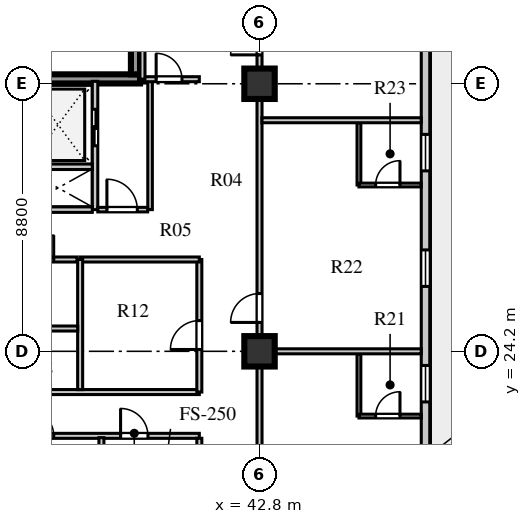
"""IFC4 building model, lengths in metres.
Left out: names, types, materials, properties, quantities, classifications, styles, units other than length and angle.
Written with IfcOpenShell. Run it as: python <this file> out.ifc"""

import sys

from ifc_helpers import new_model, si_unit, direction, frame, frame_2d, origin, origin_2d, place, context, subcontext, project, spatial, rectangle, extrude, element, fill, save


model = new_model("IFC4")
c1 = context("Model", 3, precision=1e-05, world=origin(), true_north=direction((0.0, 1.0)))
c2 = subcontext(c1, "Body", "Model", "MODEL_VIEW")
j1 = project(units=[si_unit("LENGTHUNIT", "METRE"), si_unit("PLANEANGLEUNIT", "RADIAN")], contexts=[c1])
p1 = place(None, origin())
s1 = spatial("IfcSite", under=j1, at=p1, CompositionType="ELEMENT")
p2 = place(p1, origin())
s2 = spatial("IfcBuilding", under=s1, at=p2, CompositionType="ELEMENT")
p3 = place(p2, frame((0.0, 0.0, 142.5)))
s3 = spatial("IfcBuildingStorey", under=s2, at=p3, CompositionType="ELEMENT", Elevation=142.5)
p4 = place(p3, frame((34.3, 33.16, 0.0), z_axis=(0.0, 0.0, 1.0), x_axis=(1.0, 0.0, 0.0)))
e1 = element("IfcWall", 1, at=p4, inside=s3, PredefinedType="SHEAR", context=c2, shape_type="SweptSolid", body=[
    extrude(rectangle(XDim=4.57, YDim=0.3, at=frame_2d((2.285, 0.0))), origin(), (0.0, 0.0, 1.0), 3.6),
])
p5 = place(p3, frame((38.72, 33.31, 0.0), z_axis=(0.0, 0.0, 1.0), x_axis=(0.0, 1.0, 0.0)))
e2 = element("IfcWall", 2, at=p5, inside=s3, PredefinedType="SHEAR", context=c2, shape_type="SweptSolid", body=[
    extrude(rectangle(XDim=8.03, YDim=0.3, at=frame_2d((4.015, 0.0))), origin(), (0.0, 0.0, 1.0), 3.6),
])
for number, where, z_axis, x_axis in (
    (3, (42.8, 24.2, 0.0), (0.0, 0.0, 1.0), (1.0, 0.0, 0.0)),
    (4, (42.8, 33.0, 0.0), (0.0, 0.0, 1.0), (1.0, 0.0, 0.0)),
):
    element("IfcColumn", number, at=place(p3, frame(where, z_axis=z_axis, x_axis=x_axis)), inside=s3, PredefinedType="COLUMN", context=c2, shape_type="SweptSolid", body=[
        extrude(rectangle(XDim=1.0, YDim=1.0, at=origin_2d()), origin(), (0.0, 0.0, 1.0), 3.6),
    ])
p6 = place(p3, frame((48.26, 13.33, 0.0), z_axis=(0.0, 0.0, 1.0), x_axis=(0.0, 1.0, 0.0)))
e5 = element("IfcWall", 5, at=p6, inside=s3, PredefinedType="STANDARD", context=c2, shape_type="SweptSolid", body=[
    extrude(rectangle(XDim=30.54, YDim=0.28, at=frame_2d((15.27, 0.0))), origin(), (0.0, 0.0, 1.0), 3.6),
])
p7 = place(p6, frame((2.41, 0.0, 0.0)))
e6 = element("IfcOpeningElement", 6, at=p7, cuts=e5, PredefinedType="OPENING", context=c2, shape_type="SweptSolid", body=[
    extrude(rectangle(XDim=1.0, YDim=2.05, at=frame_2d((0.5, 1.025))), frame((0.0, 0.15, 0.0), z_axis=(0.0, -1.0, 0.0), x_axis=(1.0, 0.0, 0.0)), (0.0, 0.0, 1.0), 0.3),
])
p8 = place(p6, frame((5.205, 0.0, 0.8)))
e7 = element("IfcOpeningElement", 7, at=p8, cuts=e5, PredefinedType="OPENING", context=c2, shape_type="SweptSolid", body=[
    extrude(rectangle(XDim=1.8, YDim=2.0, at=frame_2d((0.9, 1.0))), frame((0.0, 0.15, 0.0), z_axis=(0.0, -1.0, 0.0), x_axis=(1.0, 0.0, 0.0)), (0.0, 0.0, 1.0), 0.3),
])
p9 = place(p6, frame((9.205, 0.0, 0.8)))
e8 = element("IfcOpeningElement", 8, at=p9, cuts=e5, PredefinedType="OPENING", context=c2, shape_type="SweptSolid", body=[
    extrude(rectangle(XDim=1.2, YDim=1.75, at=frame_2d((0.6, 0.875))), frame((0.0, 0.15, 0.0), z_axis=(0.0, -1.0, 0.0), x_axis=(1.0, 0.0, 0.0)), (0.0, 0.0, 1.0), 0.3),
])
p10 = place(p6, frame((13.005, 0.0, 0.8)))
e9 = element("IfcOpeningElement", 9, at=p10, cuts=e5, PredefinedType="OPENING", context=c2, shape_type="SweptSolid", body=[
    extrude(rectangle(XDim=1.2, YDim=1.75, at=frame_2d((0.6, 0.875))), frame((0.0, 0.15, 0.0), z_axis=(0.0, -1.0, 0.0), x_axis=(1.0, 0.0, 0.0)), (0.0, 0.0, 1.0), 0.3),
])
p11 = place(p6, frame((16.805, 0.0, 0.8)))
e10 = element("IfcOpeningElement", 10, at=p11, cuts=e5, PredefinedType="OPENING", context=c2, shape_type="SweptSolid", body=[
    extrude(rectangle(XDim=1.2, YDim=1.75, at=frame_2d((0.6, 0.875))), frame((0.0, 0.15, 0.0), z_axis=(0.0, -1.0, 0.0), x_axis=(1.0, 0.0, 0.0)), (0.0, 0.0, 1.0), 0.3),
])
p12 = place(p6, frame((21.38, 0.0, 0.8)))
e11 = element("IfcOpeningElement", 11, at=p12, cuts=e5, PredefinedType="OPENING", context=c2, shape_type="SweptSolid", body=[
    extrude(rectangle(XDim=2.1, YDim=1.95, at=frame_2d((1.05, 0.975))), frame((0.0, 0.15, 0.0), z_axis=(0.0, -1.0, 0.0), x_axis=(1.0, 0.0, 0.0)), (0.0, 0.0, 1.0), 0.3),
])
p13 = place(p6, frame((26.905, 0.0, 0.8)))
e12 = element("IfcOpeningElement", 12, at=p13, cuts=e5, PredefinedType="OPENING", context=c2, shape_type="SweptSolid", body=[
    extrude(rectangle(XDim=1.2, YDim=1.75, at=frame_2d((0.6, 0.875))), frame((0.0, 0.15, 0.0), z_axis=(0.0, -1.0, 0.0), x_axis=(1.0, 0.0, 0.0)), (0.0, 0.0, 1.0), 0.3),
])
p14 = place(p3, frame((37.39, 28.86, 0.0), z_axis=(0.0, 0.0, 1.0), x_axis=(0.0, 1.0, 0.0)))
e13 = element("IfcWall", 13, at=p14, inside=s3, PredefinedType="SOLIDWALL", context=c2, shape_type="SweptSolid", body=[
    extrude(rectangle(XDim=4.22, YDim=0.18, at=frame_2d((2.11, 0.0))), origin(), (0.0, 0.0, 1.0), 3.6),
])
p15 = place(p14, frame((2.1, 0.0, 0.0)))
e14 = element("IfcOpeningElement", 14, at=p15, cuts=e13, PredefinedType="OPENING", context=c2, shape_type="SweptSolid", body=[
    extrude(rectangle(XDim=1.2, YDim=2.12, at=frame_2d((0.6, 1.06))), frame((0.0, 0.1, 0.0), z_axis=(0.0, -1.0, 0.0), x_axis=(1.0, 0.0, 0.0)), (0.0, 0.0, 1.0), 0.2),
])
for number, where, z_axis, x_axis in (
    (15, (35.05, 28.86, 0.0), (0.0, 0.0, 1.0), (1.0, 0.0, 0.0)),
    (16, (35.05, 30.27, 0.0), (0.0, 0.0, 1.0), (1.0, 0.0, 0.0)),
):
    element("IfcWall", number, at=place(p3, frame(where, z_axis=z_axis, x_axis=x_axis)), inside=s3, PredefinedType="SOLIDWALL", context=c2, shape_type="SweptSolid", body=[
        extrude(rectangle(XDim=2.25, YDim=0.18, at=frame_2d((1.125, 0.0))), origin(), (0.0, 0.0, 1.0), 3.6),
    ])
p16 = place(p3, frame((39.2, 28.86, 0.0), z_axis=(0.0, 0.0, 1.0), x_axis=(0.0, 1.0, 0.0)))
e17 = element("IfcWall", 17, at=p16, inside=s3, PredefinedType="PARTITIONING", context=c2, shape_type="SweptSolid", body=[
    extrude(rectangle(XDim=4.22, YDim=0.15, at=frame_2d((2.11, 0.0))), origin(), (0.0, 0.0, 1.0), 3.6),
])
p17 = place(p3, frame((37.48, 28.86, 0.0), z_axis=(0.0, 0.0, 1.0), x_axis=(1.0, 0.0, 0.0)))
e18 = element("IfcWall", 18, at=p17, inside=s3, PredefinedType="PARTITIONING", context=c2, shape_type="SweptSolid", body=[
    extrude(rectangle(XDim=1.64, YDim=0.15, at=frame_2d((0.82, 0.0))), origin(), (0.0, 0.0, 1.0), 3.6),
])
p18 = place(p17, frame((0.3, 0.0, 0.0)))
e19 = element("IfcOpeningElement", 19, at=p18, cuts=e18, PredefinedType="OPENING", context=c2, shape_type="SweptSolid", body=[
    extrude(rectangle(XDim=1.0, YDim=2.1, at=frame_2d((0.5, 1.05))), frame((0.0, 0.085, 0.0), z_axis=(0.0, -1.0, 0.0), x_axis=(1.0, 0.0, 0.0)), (0.0, 0.0, 1.0), 0.17),
])
p19 = place(p3, frame((25.22, 21.42, 0.0), z_axis=(0.0, 0.0, 1.0), x_axis=(1.0, 0.0, 0.0)))
e20 = element("IfcWall", 20, at=p19, inside=s3, PredefinedType="PARTITIONING", context=c2, shape_type="SweptSolid", body=[
    extrude(rectangle(XDim=15.6, YDim=0.165, at=frame_2d((7.8, 0.0))), origin(), (0.0, 0.0, 1.0), 3.2),
])
p20 = place(p19, frame((0.63, 0.0, 0.0)))
e21 = element("IfcOpeningElement", 21, at=p20, cuts=e20, PredefinedType="OPENING", context=c2, shape_type="SweptSolid", body=[
    extrude(rectangle(XDim=0.9, YDim=2.08, at=frame_2d((0.45, 1.04))), frame((0.0, 0.093, 0.0), z_axis=(0.0, -1.0, 0.0), x_axis=(1.0, 0.0, 0.0)), (0.0, 0.0, 1.0), 0.185),
])
p21 = place(p19, frame((3.71, 0.0, 0.0)))
e22 = element("IfcOpeningElement", 22, at=p21, cuts=e20, PredefinedType="OPENING", context=c2, shape_type="SweptSolid", body=[
    extrude(rectangle(XDim=0.9, YDim=2.08, at=frame_2d((0.45, 1.04))), frame((0.0, 0.093, 0.0), z_axis=(0.0, -1.0, 0.0), x_axis=(1.0, 0.0, 0.0)), (0.0, 0.0, 1.0), 0.185),
])
p22 = place(p19, frame((6.81, 0.0, 0.0)))
e23 = element("IfcOpeningElement", 23, at=p22, cuts=e20, PredefinedType="OPENING", context=c2, shape_type="SweptSolid", body=[
    extrude(rectangle(XDim=0.9, YDim=2.08, at=frame_2d((0.45, 1.04))), frame((0.0, 0.093, 0.0), z_axis=(0.0, -1.0, 0.0), x_axis=(1.0, 0.0, 0.0)), (0.0, 0.0, 1.0), 0.185),
])
p23 = place(p19, frame((9.91, 0.0, 0.0)))
e24 = element("IfcOpeningElement", 24, at=p23, cuts=e20, PredefinedType="OPENING", context=c2, shape_type="SweptSolid", body=[
    extrude(rectangle(XDim=0.9, YDim=2.08, at=frame_2d((0.45, 1.04))), frame((0.0, 0.093, 0.0), z_axis=(0.0, -1.0, 0.0), x_axis=(1.0, 0.0, 0.0)), (0.0, 0.0, 1.0), 0.185),
])
p24 = place(p19, frame((13.01, 0.0, 0.0)))
e25 = element("IfcOpeningElement", 25, at=p24, cuts=e20, PredefinedType="OPENING", context=c2, shape_type="SweptSolid", body=[
    extrude(rectangle(XDim=0.9, YDim=2.08, at=frame_2d((0.45, 1.04))), frame((0.0, 0.093, 0.0), z_axis=(0.0, -1.0, 0.0), x_axis=(1.0, 0.0, 0.0)), (0.0, 0.0, 1.0), 0.185),
])
p25 = place(p3, frame((27.15, 22.86, 0.0), z_axis=(0.0, 0.0, 1.0), x_axis=(1.0, 0.0, 0.0)))
e26 = element("IfcWall", 26, at=p25, inside=s3, PredefinedType="PARTITIONING", context=c2, shape_type="SweptSolid", body=[
    extrude(rectangle(XDim=13.67, YDim=0.165, at=frame_2d((6.835, 0.0))), origin(), (0.0, 0.0, 1.0), 3.6),
])
p26 = place(p25, frame((2.2, 0.0, 0.0)))
e27 = element("IfcOpeningElement", 27, at=p26, cuts=e26, PredefinedType="OPENING", context=c2, shape_type="SweptSolid", body=[
    extrude(rectangle(XDim=0.9, YDim=2.08, at=frame_2d((0.45, 1.04))), frame((0.0, 0.093, 0.0), z_axis=(0.0, -1.0, 0.0), x_axis=(1.0, 0.0, 0.0)), (0.0, 0.0, 1.0), 0.185),
])
p27 = place(p3, frame((42.8, 15.25, 0.0), z_axis=(0.0, 0.0, 1.0), x_axis=(0.0, 1.0, 0.0)))
e28 = element("IfcWall", 28, at=p27, inside=s3, PredefinedType="PARTITIONING", context=c2, shape_type="SweptSolid", body=[
    extrude(rectangle(XDim=26.7, YDim=0.165, at=frame_2d((13.35, 0.0))), origin(), (0.0, 0.0, 1.0), 2.95),
])
p28 = place(p27, frame((0.75, 0.0, 0.0)))
e29 = element("IfcOpeningElement", 29, at=p28, cuts=e28, PredefinedType="OPENING", context=c2, shape_type="SweptSolid", body=[
    extrude(rectangle(XDim=0.95, YDim=2.1, at=frame_2d((0.475, 1.05))), frame((0.0, 0.093, 0.0), z_axis=(0.0, -1.0, 0.0), x_axis=(1.0, 0.0, 0.0)), (0.0, 0.0, 1.0), 0.185),
])
p29 = place(p27, frame((9.9, 0.0, 0.0)))
e30 = element("IfcOpeningElement", 30, at=p29, cuts=e28, PredefinedType="OPENING", context=c2, shape_type="SweptSolid", body=[
    extrude(rectangle(XDim=0.95, YDim=2.1, at=frame_2d((0.475, 1.05))), frame((0.0, 0.093, 0.0), z_axis=(0.0, -1.0, 0.0), x_axis=(1.0, 0.0, 0.0)), (0.0, 0.0, 1.0), 0.185),
])
p30 = place(p27, frame((18.7, 0.0, 0.0)))
e31 = element("IfcOpeningElement", 31, at=p30, cuts=e28, PredefinedType="OPENING", context=c2, shape_type="SweptSolid", body=[
    extrude(rectangle(XDim=0.95, YDim=2.1, at=frame_2d((0.475, 1.05))), frame((0.0, 0.093, 0.0), z_axis=(0.0, -1.0, 0.0), x_axis=(1.0, 0.0, 0.0)), (0.0, 0.0, 1.0), 0.185),
])
p31 = place(p3, frame((40.82, 22.86, 0.0), z_axis=(0.0, 0.0, 1.0), x_axis=(0.0, 1.0, 0.0)))
e32 = element("IfcWall", 32, at=p31, inside=s3, PredefinedType="PARTITIONING", context=c2, shape_type="SweptSolid", body=[
    extrude(rectangle(XDim=4.36, YDim=0.165, at=frame_2d((2.18, 0.0))), origin(), (0.0, 0.0, 1.0), 3.6),
])
p32 = place(p31, frame((1.4, 0.0, 0.0)))
e33 = element("IfcOpeningElement", 33, at=p32, cuts=e32, PredefinedType="OPENING", context=c2, shape_type="SweptSolid", body=[
    extrude(rectangle(XDim=0.95, YDim=2.1, at=frame_2d((0.475, 1.05))), frame((0.0, 0.093, 0.0), z_axis=(0.0, -1.0, 0.0), x_axis=(1.0, 0.0, 0.0)), (0.0, 0.0, 1.0), 0.185),
])
p33 = place(p3, frame((36.9, 27.22, 0.0), z_axis=(0.0, 0.0, 1.0), x_axis=(1.0, 0.0, 0.0)))
e34 = element("IfcWall", 34, at=p33, inside=s3, PredefinedType="PARTITIONING", context=c2, shape_type="SweptSolid", body=[
    extrude(rectangle(XDim=3.92, YDim=0.165, at=frame_2d((1.96, 0.0))), origin(), (0.0, 0.0, 1.0), 3.2),
])
p34 = place(p3, frame((36.9, 22.94, 0.0), z_axis=(0.0, 0.0, 1.0), x_axis=(0.0, 1.0, 0.0)))
e35 = element("IfcWall", 35, at=p34, inside=s3, PredefinedType="PARTITIONING", context=c2, shape_type="SweptSolid", body=[
    extrude(rectangle(XDim=4.28, YDim=0.165, at=frame_2d((2.14, 0.0))), origin(), (0.0, 0.0, 1.0), 3.6),
])
p35 = place(p3, frame((27.15, 24.95, 0.0), z_axis=(0.0, 0.0, 1.0), x_axis=(1.0, 0.0, 0.0)))
e36 = element("IfcWall", 36, at=p35, inside=s3, PredefinedType="PARTITIONING", context=c2, shape_type="SweptSolid", body=[
    extrude(rectangle(XDim=9.67, YDim=0.165, at=frame_2d((4.835, 0.0))), origin(), (0.0, 0.0, 1.0), 3.05),
])
p36 = place(p3, frame((33.28, 27.22, 0.0), z_axis=(0.0, 0.0, 1.0), x_axis=(1.0, 0.0, 0.0)))
e37 = element("IfcWall", 37, at=p36, inside=s3, PredefinedType="PARTITIONING", context=c2, shape_type="SweptSolid", body=[
    extrude(rectangle(XDim=3.52, YDim=0.165, at=frame_2d((1.76, 0.0))), origin(), (0.0, 0.0, 1.0), 3.2),
])
p37 = place(p36, frame((1.95, 0.0, 0.0)))
e38 = element("IfcOpeningElement", 38, at=p37, cuts=e37, PredefinedType="OPENING", context=c2, shape_type="SweptSolid", body=[
    extrude(rectangle(XDim=0.8, YDim=2.05, at=frame_2d((0.4, 1.025))), frame((0.0, 0.093, 0.0), z_axis=(0.0, -1.0, 0.0), x_axis=(1.0, 0.0, 0.0)), (0.0, 0.0, 1.0), 0.185),
])
p38 = place(p3, frame((40.82, 10.28, 0.0), z_axis=(0.0, 0.0, 1.0), x_axis=(0.0, 1.0, 0.0)))
e39 = element("IfcWall", 39, at=p38, inside=s3, PredefinedType="PARTITIONING", context=c2, shape_type="SweptSolid", body=[
    extrude(rectangle(XDim=11.06, YDim=0.165, at=frame_2d((5.53, 0.0))), origin(), (0.0, 0.0, 1.0), 3.6),
])
p39 = place(p3, frame((37.6, 10.28, 0.0), z_axis=(0.0, 0.0, 1.0), x_axis=(0.0, 1.0, 0.0)))
e40 = element("IfcWall", 40, at=p39, inside=s3, PredefinedType="PARTITIONING", context=c2, shape_type="SweptSolid", body=[
    extrude(rectangle(XDim=11.08, YDim=0.165, at=frame_2d((5.54, 0.0))), origin(), (0.0, 0.0, 1.0), 3.6),
])
p40 = place(p3, frame((46.07, 22.07, 0.0), z_axis=(0.0, 0.0, 1.0), x_axis=(0.0, 1.0, 0.0)))
e41 = element("IfcWall", 41, at=p40, inside=s3, PredefinedType="PLUMBINGWALL", context=c2, shape_type="SweptSolid", body=[
    extrude(rectangle(XDim=2.05, YDim=0.125, at=frame_2d((1.025, 0.0))), origin(), (0.0, 0.0, 1.0), 3.6),
])
p41 = place(p3, frame((46.07, 22.07, 0.0), z_axis=(0.0, 0.0, 1.0), x_axis=(1.0, 0.0, 0.0)))
e42 = element("IfcWall", 42, at=p41, inside=s3, PredefinedType="PLUMBINGWALL", context=c2, shape_type="SweptSolid", body=[
    extrude(rectangle(XDim=2.05, YDim=0.125, at=frame_2d((1.025, 0.0))), origin(), (0.0, 0.0, 1.0), 3.6),
])
p42 = place(p41, frame((0.55, 0.0, 0.0)))
e43 = element("IfcOpeningElement", 43, at=p42, cuts=e42, PredefinedType="OPENING", context=c2, shape_type="SweptSolid", body=[
    extrude(rectangle(XDim=0.8, YDim=2.05, at=frame_2d((0.4, 1.025))), frame((0.0, 0.073, 0.0), z_axis=(0.0, -1.0, 0.0), x_axis=(1.0, 0.0, 0.0)), (0.0, 0.0, 1.0), 0.145),
])
p43 = place(p3, frame((42.88, 24.2, 0.0), z_axis=(0.0, 0.0, 1.0), x_axis=(1.0, 0.0, 0.0)))
e44 = element("IfcWall", 44, at=p43, inside=s3, PredefinedType="PARTITIONING", context=c2, shape_type="SweptSolid", body=[
    extrude(rectangle(XDim=5.24, YDim=0.165, at=frame_2d((2.62, 0.0))), origin(), (0.0, 0.0, 1.0), 3.1),
])
p44 = place(p3, frame((46.07, 29.67, 0.0), z_axis=(0.0, 0.0, 1.0), x_axis=(0.0, 1.0, 0.0)))
e45 = element("IfcWall", 45, at=p44, inside=s3, PredefinedType="PLUMBINGWALL", context=c2, shape_type="SweptSolid", body=[
    extrude(rectangle(XDim=2.05, YDim=0.125, at=frame_2d((1.025, 0.0))), origin(), (0.0, 0.0, 1.0), 3.6),
])
p45 = place(p3, frame((46.07, 29.67, 0.0), z_axis=(0.0, 0.0, 1.0), x_axis=(1.0, 0.0, 0.0)))
e46 = element("IfcWall", 46, at=p45, inside=s3, PredefinedType="PLUMBINGWALL", context=c2, shape_type="SweptSolid", body=[
    extrude(rectangle(XDim=2.05, YDim=0.125, at=frame_2d((1.025, 0.0))), origin(), (0.0, 0.0, 1.0), 3.6),
])
p46 = place(p45, frame((0.55, 0.0, 0.0)))
e47 = element("IfcOpeningElement", 47, at=p46, cuts=e46, PredefinedType="OPENING", context=c2, shape_type="SweptSolid", body=[
    extrude(rectangle(XDim=0.8, YDim=2.05, at=frame_2d((0.4, 1.025))), frame((0.0, 0.073, 0.0), z_axis=(0.0, -1.0, 0.0), x_axis=(1.0, 0.0, 0.0)), (0.0, 0.0, 1.0), 0.145),
])
p47 = place(p3, frame((42.88, 31.8, 0.0), z_axis=(0.0, 0.0, 1.0), x_axis=(1.0, 0.0, 0.0)))
e48 = element("IfcWall", 48, at=p47, inside=s3, PredefinedType="PARTITIONING", context=c2, shape_type="SweptSolid", body=[
    extrude(rectangle(XDim=5.24, YDim=0.165, at=frame_2d((2.62, 0.0))), origin(), (0.0, 0.0, 1.0), 3.6),
])
p48 = place(p3, frame((38.95, 33.15, 0.0), z_axis=(0.0, 0.0, 1.0), x_axis=(1.0, 0.0, 0.0)))
e49 = element("IfcWall", 49, at=p48, inside=s3, PredefinedType="PARTITIONING", context=c2, shape_type="SweptSolid", body=[
    extrude(rectangle(XDim=1.87, YDim=0.165, at=frame_2d((0.935, 0.0))), origin(), (0.0, 0.0, 1.0), 3.6),
])
p49 = place(p48, frame((0.45, 0.0, 0.0)))
e50 = element("IfcOpeningElement", 50, at=p49, cuts=e49, PredefinedType="OPENING", context=c2, shape_type="SweptSolid", body=[
    extrude(rectangle(XDim=0.85, YDim=2.05, at=frame_2d((0.425, 1.025))), frame((0.0, 0.093, 0.0), z_axis=(0.0, -1.0, 0.0), x_axis=(1.0, 0.0, 0.0)), (0.0, 0.0, 1.0), 0.185),
])
p50 = place(p3, frame((38.95, 33.15, 0.0), z_axis=(0.0, 0.0, 1.0), x_axis=(0.0, 1.0, 0.0)))
e51 = element("IfcWall", 51, at=p50, inside=s3, PredefinedType="PARTITIONING", context=c2, shape_type="SweptSolid", body=[
    extrude(rectangle(XDim=8.7, YDim=0.165, at=frame_2d((4.35, 0.0))), origin(), (0.0, 0.0, 1.0), 3.6),
])
p51 = place(p9, origin())
e52 = element("IfcWindow", 52, at=p51, inside=s3, PartitioningType="SINGLE_PANEL", PredefinedType="WINDOW", context=c2, shape_type="SweptSolid", body=[
    extrude(rectangle(XDim=1.2, YDim=1.75, at=frame_2d((0.6, 0.875))), frame((0.0, 0.03, 0.0), z_axis=(0.0, -1.0, 0.0), x_axis=(1.0, 0.0, 0.0)), (0.0, 0.0, 1.0), 0.06),
])
fill(e8, e52)
p52 = place(p10, origin())
e53 = element("IfcWindow", 53, at=p52, inside=s3, PartitioningType="SINGLE_PANEL", PredefinedType="WINDOW", context=c2, shape_type="SweptSolid", body=[
    extrude(rectangle(XDim=1.2, YDim=1.75, at=frame_2d((0.6, 0.875))), frame((0.0, 0.03, 0.0), z_axis=(0.0, -1.0, 0.0), x_axis=(1.0, 0.0, 0.0)), (0.0, 0.0, 1.0), 0.06),
])
fill(e9, e53)
p53 = place(p11, origin())
e54 = element("IfcWindow", 54, at=p53, inside=s3, PartitioningType="SINGLE_PANEL", PredefinedType="WINDOW", context=c2, shape_type="SweptSolid", body=[
    extrude(rectangle(XDim=1.2, YDim=1.75, at=frame_2d((0.6, 0.875))), frame((0.0, 0.03, 0.0), z_axis=(0.0, -1.0, 0.0), x_axis=(1.0, 0.0, 0.0)), (0.0, 0.0, 1.0), 0.06),
])
fill(e10, e54)
p54 = place(p15, frame((1.2, 0.0, 0.0), z_axis=(0.0, 0.0, 1.0), x_axis=(-1.0, 0.0, 0.0)))
e55 = element("IfcDoor", 55, at=p54, inside=s3, OperationType="DOUBLE_DOOR_SLIDING", PredefinedType="DOOR", context=c2, shape_type="SweptSolid", body=[
    extrude(rectangle(XDim=1.2, YDim=2.12, at=frame_2d((0.6, 1.06))), frame((0.0, 0.025, 0.0), z_axis=(0.0, -1.0, 0.0), x_axis=(1.0, 0.0, 0.0)), (0.0, 0.0, 1.0), 0.05),
])
fill(e14, e55)
p55 = place(p18, origin())
e56 = element("IfcDoor", 56, at=p55, inside=s3, OperationType="SINGLE_SWING_LEFT", PredefinedType="DOOR", context=c2, shape_type="SweptSolid", body=[
    extrude(rectangle(XDim=1.0, YDim=2.1, at=frame_2d((0.5, 1.05))), frame((0.0, 0.025, 0.0), z_axis=(0.0, -1.0, 0.0), x_axis=(1.0, 0.0, 0.0)), (0.0, 0.0, 1.0), 0.05),
])
fill(e19, e56)
p56 = place(p37, frame((0.8, 0.0, 0.0), z_axis=(0.0, 0.0, 1.0), x_axis=(-1.0, 0.0, 0.0)))
e57 = element("IfcDoor", 57, at=p56, inside=s3, OperationType="SINGLE_SWING_LEFT", PredefinedType="DOOR", context=c2, shape_type="SweptSolid", body=[
    extrude(rectangle(XDim=0.8, YDim=2.05, at=frame_2d((0.4, 1.025))), frame((0.0, 0.025, 0.0), z_axis=(0.0, -1.0, 0.0), x_axis=(1.0, 0.0, 0.0)), (0.0, 0.0, 1.0), 0.05),
])
fill(e38, e57)
p57 = place(p32, frame((0.95, 0.0, 0.0), z_axis=(0.0, 0.0, 1.0), x_axis=(-1.0, 0.0, 0.0)))
e58 = element("IfcDoor", 58, at=p57, inside=s3, OperationType="SINGLE_SWING_RIGHT", PredefinedType="DOOR", context=c2, shape_type="SweptSolid", body=[
    extrude(rectangle(XDim=0.95, YDim=2.1, at=frame_2d((0.475, 1.05))), frame((0.0, 0.025, 0.0), z_axis=(0.0, -1.0, 0.0), x_axis=(1.0, 0.0, 0.0)), (0.0, 0.0, 1.0), 0.05),
])
fill(e33, e58)
p58 = place(p23, frame((0.9, 0.0, 0.0), z_axis=(0.0, 0.0, 1.0), x_axis=(-1.0, 0.0, 0.0)))
e59 = element("IfcDoor", 59, at=p58, inside=s3, OperationType="SINGLE_SWING_RIGHT", PredefinedType="DOOR", context=c2, shape_type="SweptSolid", body=[
    extrude(rectangle(XDim=0.9, YDim=2.08, at=frame_2d((0.45, 1.04))), frame((0.0, 0.025, 0.0), z_axis=(0.0, -1.0, 0.0), x_axis=(1.0, 0.0, 0.0)), (0.0, 0.0, 1.0), 0.05),
])
fill(e24, e59)
p59 = place(p24, frame((0.9, 0.0, 0.0), z_axis=(0.0, 0.0, 1.0), x_axis=(-1.0, 0.0, 0.0)))
e60 = element("IfcDoor", 60, at=p59, inside=s3, OperationType="SINGLE_SWING_RIGHT", PredefinedType="DOOR", context=c2, shape_type="SweptSolid", body=[
    extrude(rectangle(XDim=0.9, YDim=2.08, at=frame_2d((0.45, 1.04))), frame((0.0, 0.025, 0.0), z_axis=(0.0, -1.0, 0.0), x_axis=(1.0, 0.0, 0.0)), (0.0, 0.0, 1.0), 0.05),
])
fill(e25, e60)
p60 = place(p42, frame((0.8, 0.0, 0.0), z_axis=(0.0, 0.0, 1.0), x_axis=(-1.0, 0.0, 0.0)))
e61 = element("IfcDoor", 61, at=p60, inside=s3, OperationType="SINGLE_SWING_LEFT", PredefinedType="DOOR", context=c2, shape_type="SweptSolid", body=[
    extrude(rectangle(XDim=0.8, YDim=2.05, at=frame_2d((0.4, 1.025))), frame((0.0, 0.025, 0.0), z_axis=(0.0, -1.0, 0.0), x_axis=(1.0, 0.0, 0.0)), (0.0, 0.0, 1.0), 0.05),
])
fill(e43, e61)
p61 = place(p29, origin())
e62 = element("IfcDoor", 62, at=p61, inside=s3, OperationType="SINGLE_SWING_LEFT", PredefinedType="DOOR", context=c2, shape_type="SweptSolid", body=[
    extrude(rectangle(XDim=0.95, YDim=2.1, at=frame_2d((0.475, 1.05))), frame((0.0, 0.025, 0.0), z_axis=(0.0, -1.0, 0.0), x_axis=(1.0, 0.0, 0.0)), (0.0, 0.0, 1.0), 0.05),
])
fill(e30, e62)
p62 = place(p46, frame((0.8, 0.0, 0.0), z_axis=(0.0, 0.0, 1.0), x_axis=(-1.0, 0.0, 0.0)))
e63 = element("IfcDoor", 63, at=p62, inside=s3, OperationType="SINGLE_SWING_LEFT", PredefinedType="DOOR", context=c2, shape_type="SweptSolid", body=[
    extrude(rectangle(XDim=0.8, YDim=2.05, at=frame_2d((0.4, 1.025))), frame((0.0, 0.025, 0.0), z_axis=(0.0, -1.0, 0.0), x_axis=(1.0, 0.0, 0.0)), (0.0, 0.0, 1.0), 0.05),
])
fill(e47, e63)
p63 = place(p30, origin())
e64 = element("IfcDoor", 64, at=p63, inside=s3, OperationType="SINGLE_SWING_LEFT", PredefinedType="DOOR", context=c2, shape_type="SweptSolid", body=[
    extrude(rectangle(XDim=0.95, YDim=2.1, at=frame_2d((0.475, 1.05))), frame((0.0, 0.025, 0.0), z_axis=(0.0, -1.0, 0.0), x_axis=(1.0, 0.0, 0.0)), (0.0, 0.0, 1.0), 0.05),
])
fill(e31, e64)
p64 = place(p49, origin())
e65 = element("IfcDoor", 65, at=p64, inside=s3, OperationType="SINGLE_SWING_LEFT", PredefinedType="DOOR", context=c2, shape_type="SweptSolid", body=[
    extrude(rectangle(XDim=0.85, YDim=2.05, at=frame_2d((0.425, 1.025))), frame((0.0, 0.025, 0.0), z_axis=(0.0, -1.0, 0.0), x_axis=(1.0, 0.0, 0.0)), (0.0, 0.0, 1.0), 0.05),
])
fill(e50, e65)
save(model, sys.argv[1])
